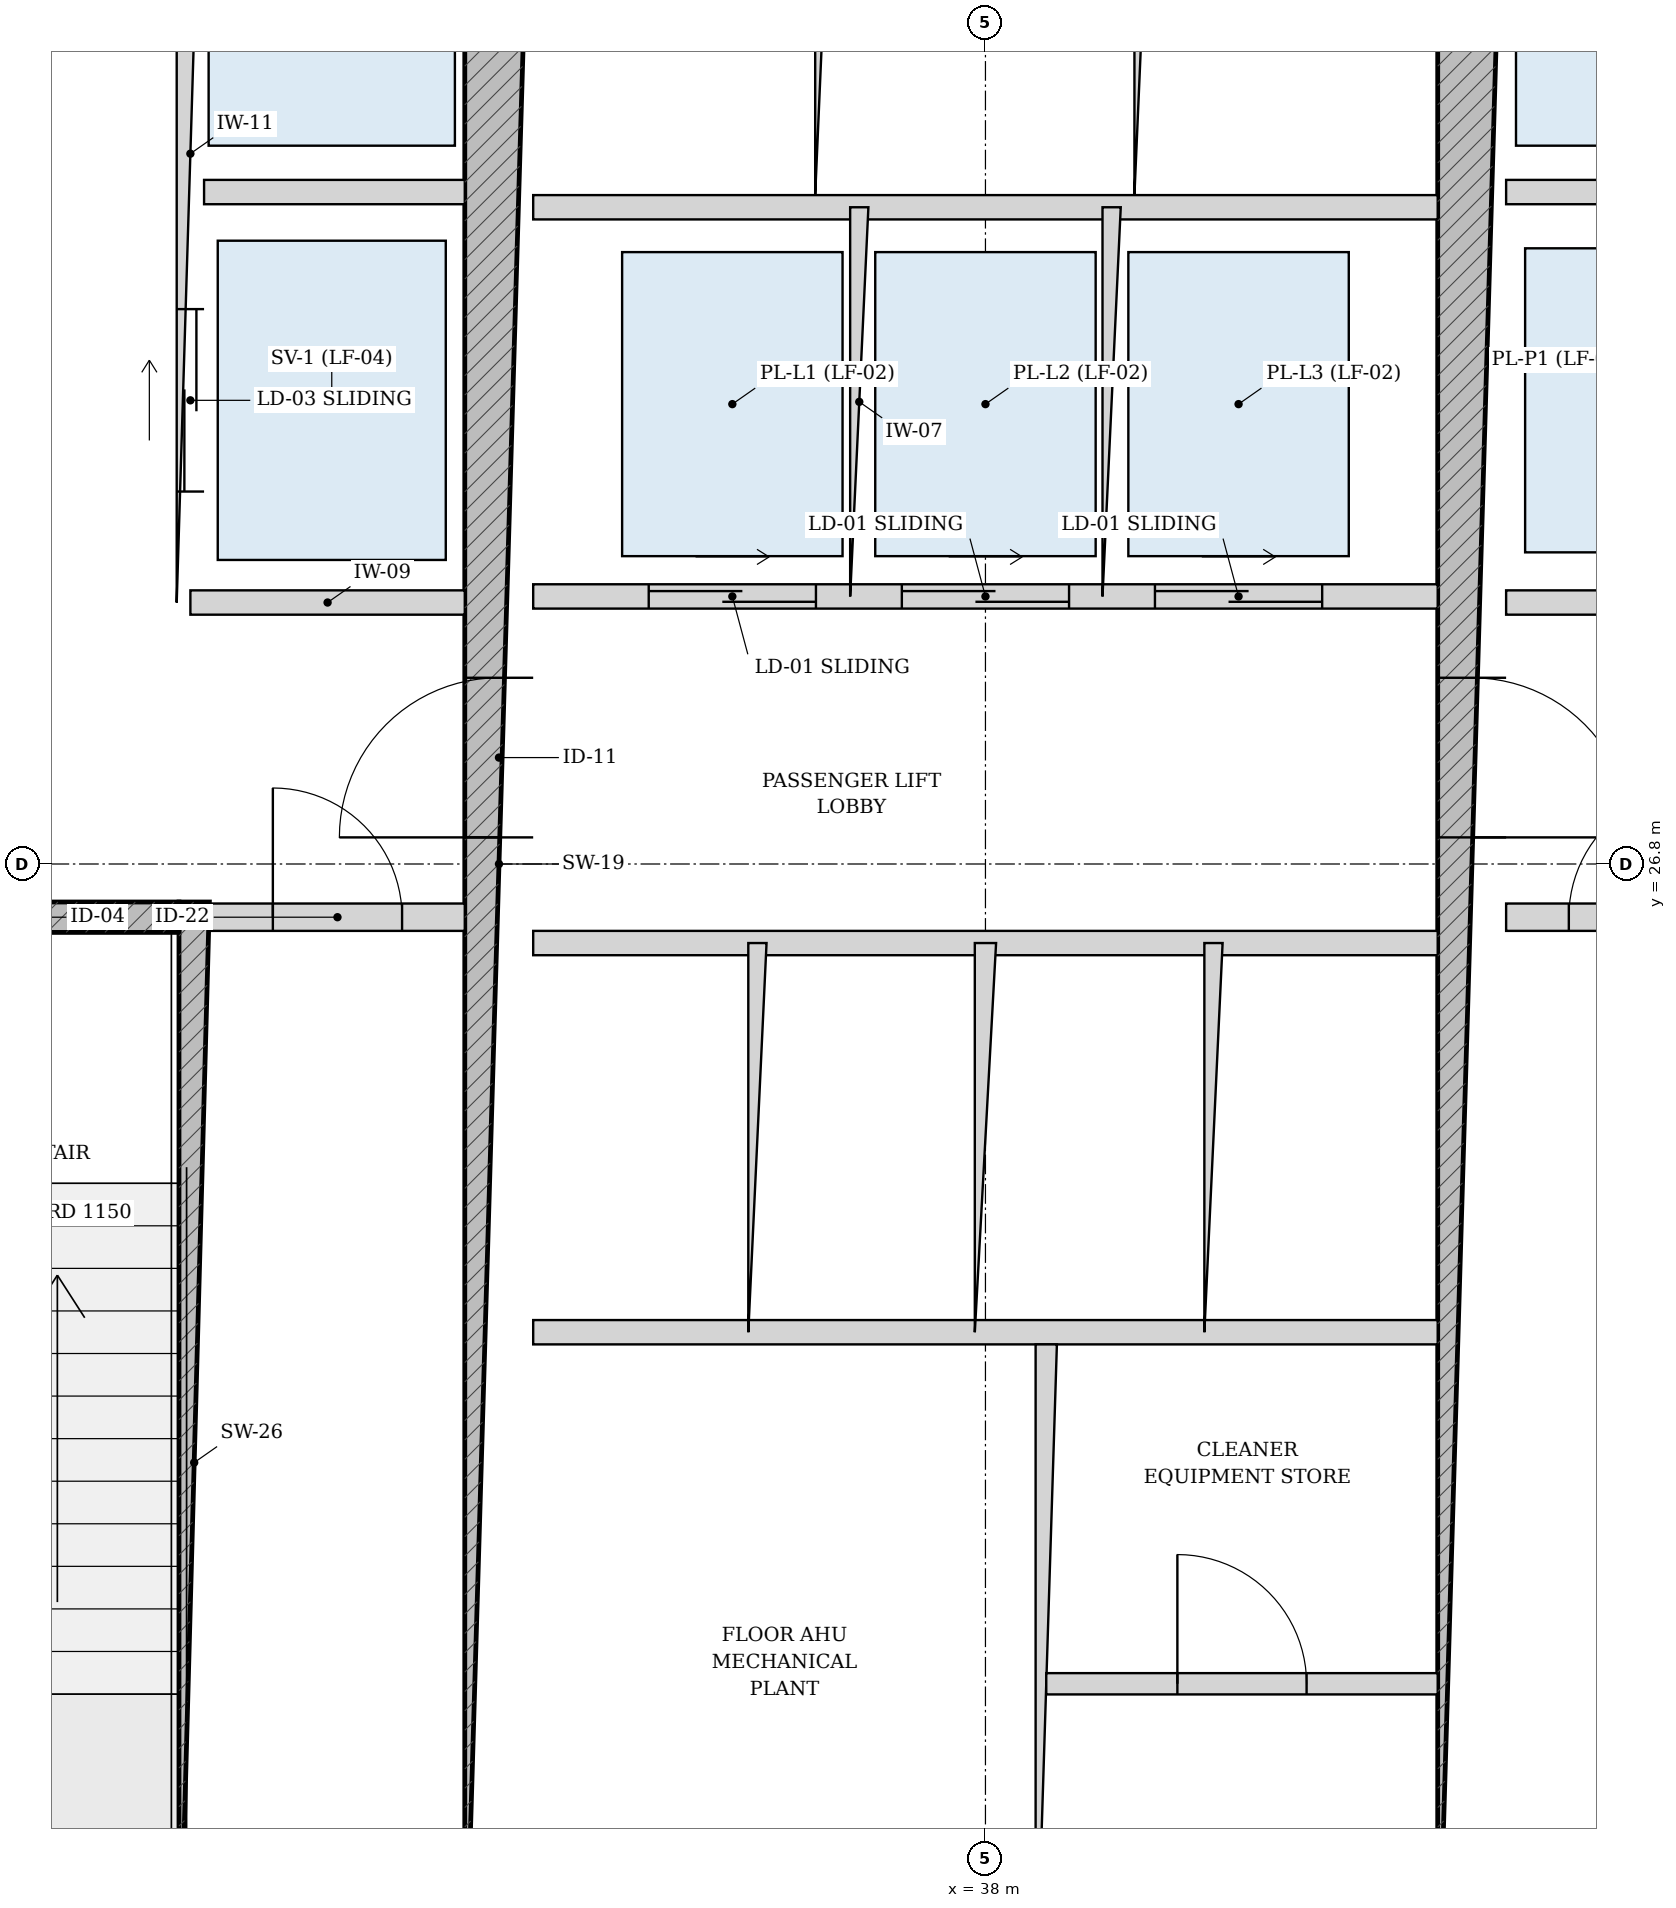
"""IFC4 building model, lengths in metres.
Left out: names, types, materials, properties, quantities, classifications, styles, units other than length and angle.
Written with IfcOpenShell. Run it as: python <this file> out.ifc"""

import sys

from ifc_helpers import new_model, si_unit, direction, frame, frame_2d, origin, place, context, subcontext, project, spatial, rectangle, extrude, source, transform, mapped, element, fill, save


model = new_model("IFC4")
c1 = context("Model", 3, precision=1e-05, world=origin(), true_north=direction((-0.2419218956, 0.970295726276)))
c2 = subcontext(c1, "Body", "Model", "MODEL_VIEW")
j1 = project(units=[si_unit("LENGTHUNIT", "METRE"), si_unit("PLANEANGLEUNIT", "RADIAN")], contexts=[c1])
p1 = place(None, origin())
s1 = spatial("IfcSite", under=j1, at=p1, CompositionType="ELEMENT")
p2 = place(p1, origin())
s2 = spatial("IfcBuilding", under=s1, at=p2, CompositionType="ELEMENT")
p3 = place(p2, frame((0.0, 0.0, 14.4)))
s3 = spatial("IfcBuildingStorey", under=s2, at=p3, CompositionType="ELEMENT", Elevation=14.4)
p4 = place(p3, frame((32.795, 19.175, 0.0), z_axis=(0.0, 0.0, 1.0), x_axis=(0.0, 1.0, 0.0)))
e1 = element("IfcWall", 1, at=p4, inside=s3, PredefinedType="SOLIDWALL", context=c2, shape_type="SweptSolid", body=[
    extrude(rectangle(XDim=7.375, YDim=0.2, at=frame_2d((3.688, 0.0))), origin(), (0.0, 0.0, 1.0), 4.05),
])
p5 = place(p3, frame((29.375, 26.45, 0.0), z_axis=(0.0, 0.0, 1.0), x_axis=(1.0, 0.0, 0.0)))
e2 = element("IfcWall", 2, at=p5, inside=s3, PredefinedType="SOLIDWALL", context=c2, shape_type="SweptSolid", body=[
    extrude(rectangle(XDim=3.32, YDim=0.2, at=frame_2d((1.66, 0.0))), origin(), (0.0, 0.0, 1.0), 4.05),
])
p6 = place(p5, frame((1.185, 0.0, 0.0)))
e3 = element("IfcOpeningElement", 3, at=p6, cuts=e2, PredefinedType="OPENING", context=c2, shape_type="SweptSolid", body=[
    extrude(rectangle(XDim=0.95, YDim=2.15, at=frame_2d((0.475, 1.075))), frame((0.0, 0.11, 0.0), z_axis=(0.0, -1.0, 0.0), x_axis=(1.0, 0.0, 0.0)), (0.0, 0.0, 1.0), 0.22),
])
p7 = place(p3, frame((34.8, 19.175, 0.0), z_axis=(0.0, 0.0, 1.0), x_axis=(0.0, 1.0, 0.0)))
e4 = element("IfcWall", 4, at=p7, inside=s3, PredefinedType="SHEAR", context=c2, shape_type="SweptSolid", body=[
    extrude(rectangle(XDim=15.25, YDim=0.45, at=frame_2d((7.625, 0.0))), origin(), (0.0, 0.0, 1.0), 4.05),
])
p8 = place(p7, frame((7.8, 0.0, 0.0)))
e5 = element("IfcOpeningElement", 5, at=p8, cuts=e4, PredefinedType="OPENING", context=c2, shape_type="SweptSolid", body=[
    extrude(rectangle(XDim=1.05, YDim=2.15, at=frame_2d((0.525, 1.075))), frame((0.0, 0.235, 0.0), z_axis=(0.0, -1.0, 0.0), x_axis=(1.0, 0.0, 0.0)), (0.0, 0.0, 1.0), 0.47),
])
p9 = place(p3, frame((41.2, 19.175, 0.0), z_axis=(0.0, 0.0, 1.0), x_axis=(0.0, 1.0, 0.0)))
e6 = element("IfcWall", 6, at=p9, inside=s3, PredefinedType="SHEAR", context=c2, shape_type="SweptSolid", body=[
    extrude(rectangle(XDim=15.25, YDim=0.45, at=frame_2d((7.625, 0.0))), origin(), (0.0, 0.0, 1.0), 4.05),
])
p10 = place(p9, frame((7.8, 0.0, 0.0)))
e7 = element("IfcOpeningElement", 7, at=p10, cuts=e6, PredefinedType="OPENING", context=c2, shape_type="SweptSolid", body=[
    extrude(rectangle(XDim=1.05, YDim=2.15, at=frame_2d((0.525, 1.075))), frame((0.0, 0.235, 0.0), z_axis=(0.0, -1.0, 0.0), x_axis=(1.0, 0.0, 0.0)), (0.0, 0.0, 1.0), 0.47),
])
p11 = place(p3, frame((32.9, 26.45, 0.0), z_axis=(0.0, 0.0, 1.0), x_axis=(1.0, 0.0, 0.0)))
e8 = element("IfcWall", 8, at=p11, inside=s3, PredefinedType="PARTITIONING", context=c2, shape_type="SweptSolid", body=[
    extrude(rectangle(XDim=1.675, YDim=0.18, at=frame_2d((0.837, 0.0))), origin(), (0.0, 0.0, 1.0), 4.05),
])
p12 = place(p11, frame((0.413, 0.0, 0.0)))
e9 = element("IfcOpeningElement", 9, at=p12, cuts=e8, PredefinedType="OPENING", context=c2, shape_type="SweptSolid", body=[
    extrude(rectangle(XDim=0.85, YDim=2.1, at=frame_2d((0.425, 1.05))), frame((0.0, 0.1, 0.0), z_axis=(0.0, -1.0, 0.0), x_axis=(1.0, 0.0, 0.0)), (0.0, 0.0, 1.0), 0.2),
])
p13 = place(p3, frame((41.425, 26.45, 0.0), z_axis=(0.0, 0.0, 1.0), x_axis=(1.0, 0.0, 0.0)))
e10 = element("IfcWall", 10, at=p13, inside=s3, PredefinedType="PARTITIONING", context=c2, shape_type="SweptSolid", body=[
    extrude(rectangle(XDim=1.675, YDim=0.18, at=frame_2d((0.837, 0.0))), origin(), (0.0, 0.0, 1.0), 4.05),
])
p14 = place(p13, frame((0.413, 0.0, 0.0)))
e11 = element("IfcOpeningElement", 11, at=p14, cuts=e10, PredefinedType="OPENING", context=c2, shape_type="SweptSolid", body=[
    extrude(rectangle(XDim=0.85, YDim=2.1, at=frame_2d((0.425, 1.05))), frame((0.0, 0.1, 0.0), z_axis=(0.0, -1.0, 0.0), x_axis=(1.0, 0.0, 0.0)), (0.0, 0.0, 1.0), 0.2),
])
p15 = place(p3, frame((32.77, 28.52, 0.0), z_axis=(0.0, 0.0, 1.0), x_axis=(0.0, 1.0, 0.0)))
e12 = element("IfcWall", 12, at=p15, inside=s3, PredefinedType="PARTITIONING", context=c2, shape_type="SweptSolid", body=[
    extrude(rectangle(XDim=5.905, YDim=0.18, at=frame_2d((2.953, 0.0))), origin(), (0.0, 0.0, 1.0), 4.05),
])
p16 = place(p15, frame((3.655, 0.0, 0.0)))
e13 = element("IfcOpeningElement", 13, at=p16, cuts=e12, PredefinedType="OPENING", context=c2, shape_type="SweptSolid", body=[
    extrude(rectangle(XDim=1.15, YDim=2.2, at=frame_2d((0.575, 1.1))), frame((0.0, 0.1, 0.0), z_axis=(0.0, -1.0, 0.0), x_axis=(1.0, 0.0, 0.0)), (0.0, 0.0, 1.0), 0.2),
])
p17 = place(p15, frame((0.73, 0.0, 0.0)))
e14 = element("IfcOpeningElement", 14, at=p17, cuts=e12, PredefinedType="OPENING", context=c2, shape_type="SweptSolid", body=[
    extrude(rectangle(XDim=1.2, YDim=2.25, at=frame_2d((0.6, 1.125))), frame((0.0, 0.1, 0.0), z_axis=(0.0, -1.0, 0.0), x_axis=(1.0, 0.0, 0.0)), (0.0, 0.0, 1.0), 0.2),
])
p18 = place(p3, frame((32.86, 31.22, 0.0), z_axis=(0.0, 0.0, 1.0), x_axis=(1.0, 0.0, 0.0)))
e15 = element("IfcWall", 15, at=p18, inside=s3, PredefinedType="PARTITIONING", context=c2, shape_type="SweptSolid", body=[
    extrude(rectangle(XDim=1.715, YDim=0.16, at=frame_2d((0.857, 0.0))), origin(), (0.0, 0.0, 1.0), 4.05),
])
p19 = place(p3, frame((32.77, 28.52, 0.0), z_axis=(0.0, 0.0, 1.0), x_axis=(1.0, 0.0, 0.0)))
e16 = element("IfcWall", 16, at=p19, inside=s3, PredefinedType="PARTITIONING", context=c2, shape_type="SweptSolid", body=[
    extrude(rectangle(XDim=1.805, YDim=0.16, at=frame_2d((0.902, 0.0))), origin(), (0.0, 0.0, 1.0), 4.05),
])
p20 = place(p3, frame((41.425, 31.22, 0.0), z_axis=(0.0, 0.0, 1.0), x_axis=(1.0, 0.0, 0.0)))
e17 = element("IfcWall", 17, at=p20, inside=s3, PredefinedType="PARTITIONING", context=c2, shape_type="SweptSolid", body=[
    extrude(rectangle(XDim=1.715, YDim=0.16, at=frame_2d((0.857, 0.0))), origin(), (0.0, 0.0, 1.0), 4.05),
])
p21 = place(p3, frame((41.425, 28.52, 0.0), z_axis=(0.0, 0.0, 1.0), x_axis=(1.0, 0.0, 0.0)))
e18 = element("IfcWall", 18, at=p21, inside=s3, PredefinedType="PARTITIONING", context=c2, shape_type="SweptSolid", body=[
    extrude(rectangle(XDim=1.805, YDim=0.16, at=frame_2d((0.902, 0.0))), origin(), (0.0, 0.0, 1.0), 4.05),
])
p22 = place(p3, frame((35.025, 28.56, 0.0), z_axis=(0.0, 0.0, 1.0), x_axis=(1.0, 0.0, 0.0)))
e19 = element("IfcWall", 19, at=p22, inside=s3, PredefinedType="PARTITIONING", context=c2, shape_type="SweptSolid", body=[
    extrude(rectangle(XDim=5.95, YDim=0.16, at=frame_2d((2.975, 0.0))), origin(), (0.0, 0.0, 1.0), 4.05),
])
p23 = place(p22, frame((0.76, 0.0, 0.0)))
e20 = element("IfcOpeningElement", 20, at=p23, cuts=e19, PredefinedType="OPENING", context=c2, shape_type="SweptSolid", body=[
    extrude(rectangle(XDim=1.1, YDim=2.2, at=frame_2d((0.55, 1.1))), frame((0.0, 0.09, 0.0), z_axis=(0.0, -1.0, 0.0), x_axis=(1.0, 0.0, 0.0)), (0.0, 0.0, 1.0), 0.18),
])
p24 = place(p22, frame((2.425, 0.0, 0.0)))
e21 = element("IfcOpeningElement", 21, at=p24, cuts=e19, PredefinedType="OPENING", context=c2, shape_type="SweptSolid", body=[
    extrude(rectangle(XDim=1.1, YDim=2.2, at=frame_2d((0.55, 1.1))), frame((0.0, 0.09, 0.0), z_axis=(0.0, -1.0, 0.0), x_axis=(1.0, 0.0, 0.0)), (0.0, 0.0, 1.0), 0.18),
])
p25 = place(p22, frame((4.09, 0.0, 0.0)))
e22 = element("IfcOpeningElement", 22, at=p25, cuts=e19, PredefinedType="OPENING", context=c2, shape_type="SweptSolid", body=[
    extrude(rectangle(XDim=1.1, YDim=2.2, at=frame_2d((0.55, 1.1))), frame((0.0, 0.09, 0.0), z_axis=(0.0, -1.0, 0.0), x_axis=(1.0, 0.0, 0.0)), (0.0, 0.0, 1.0), 0.18),
])
p26 = place(p3, frame((35.025, 31.12, 0.0), z_axis=(0.0, 0.0, 1.0), x_axis=(1.0, 0.0, 0.0)))
e23 = element("IfcWall", 23, at=p26, inside=s3, PredefinedType="PARTITIONING", context=c2, shape_type="SweptSolid", body=[
    extrude(rectangle(XDim=5.95, YDim=0.16, at=frame_2d((2.975, 0.0))), origin(), (0.0, 0.0, 1.0), 4.05),
])
for number, where, z_axis, x_axis in (
    (24, (37.17, 28.56, 0.0), (0.0, 0.0, 1.0), (0.0, 1.0, 0.0)),
    (25, (38.83, 28.56, 0.0), (0.0, 0.0, 1.0), (0.0, 1.0, 0.0)),
):
    element("IfcWall", number, at=place(p3, frame(where, z_axis=z_axis, x_axis=x_axis)), inside=s3, PredefinedType="PARTITIONING", context=c2, shape_type="SweptSolid", body=[
        extrude(rectangle(XDim=2.56, YDim=0.12, at=frame_2d((1.28, 0.0))), origin(), (0.0, 0.0, 1.0), 4.05),
    ])
for number, where, z_axis, x_axis in (
    (26, (36.95, 31.2, 0.0), (0.0, 0.0, 1.0), (0.0, 1.0, 0.0)),
    (27, (39.05, 31.2, 0.0), (0.0, 0.0, 1.0), (0.0, 1.0, 0.0)),
):
    element("IfcWall", number, at=place(p3, frame(where, z_axis=z_axis, x_axis=x_axis)), inside=s3, PredefinedType="PARTITIONING", context=c2, shape_type="SweptSolid", body=[
        extrude(rectangle(XDim=3.225, YDim=0.14, at=frame_2d((1.613, 0.0))), origin(), (0.0, 0.0, 1.0), 4.05),
    ])
for number, where, z_axis, x_axis in (
    (28, (35.025, 26.28, 0.0), (0.0, 0.0, 1.0), (1.0, 0.0, 0.0)),
    (29, (35.025, 23.72, 0.0), (0.0, 0.0, 1.0), (1.0, 0.0, 0.0)),
):
    element("IfcWall", number, at=place(p3, frame(where, z_axis=z_axis, x_axis=x_axis)), inside=s3, PredefinedType="PARTITIONING", context=c2, shape_type="SweptSolid", body=[
        extrude(rectangle(XDim=5.95, YDim=0.16, at=frame_2d((2.975, 0.0))), origin(), (0.0, 0.0, 1.0), 4.05),
    ])
p27 = place(p3, frame((36.5, 23.72, 0.0), z_axis=(0.0, 0.0, 1.0), x_axis=(0.0, 1.0, 0.0)))
e30 = element("IfcWall", 30, at=p27, inside=s3, PredefinedType="PARTITIONING", context=c2, shape_type="SweptSolid", body=[
    extrude(rectangle(XDim=2.56, YDim=0.12, at=frame_2d((1.28, 0.0))), origin(), (0.0, 0.0, 1.0), 4.05),
])
p28 = place(p3, frame((38.0, 23.72, 0.0), z_axis=(0.0, 0.0, 1.0), x_axis=(0.0, 1.0, 0.0)))
e31 = element("IfcWall", 31, at=p28, inside=s3, PredefinedType="PARTITIONING", context=c2, shape_type="SweptSolid", body=[
    extrude(rectangle(XDim=2.56, YDim=0.14, at=frame_2d((1.28, 0.0))), origin(), (0.0, 0.0, 1.0), 4.05),
])
p29 = place(p3, frame((39.5, 23.72, 0.0), z_axis=(0.0, 0.0, 1.0), x_axis=(0.0, 1.0, 0.0)))
e32 = element("IfcWall", 32, at=p29, inside=s3, PredefinedType="PARTITIONING", context=c2, shape_type="SweptSolid", body=[
    extrude(rectangle(XDim=2.56, YDim=0.12, at=frame_2d((1.28, 0.0))), origin(), (0.0, 0.0, 1.0), 4.05),
])
p30 = place(p3, frame((38.4, 19.175, 0.0), z_axis=(0.0, 0.0, 1.0), x_axis=(0.0, 1.0, 0.0)))
e33 = element("IfcWall", 33, at=p30, inside=s3, PredefinedType="PARTITIONING", context=c2, shape_type="SweptSolid", body=[
    extrude(rectangle(XDim=4.465, YDim=0.14, at=frame_2d((2.232, 0.0))), origin(), (0.0, 0.0, 1.0), 4.05),
])
p31 = place(p3, frame((38.4, 21.407, 0.0), z_axis=(0.0, 0.0, 1.0), x_axis=(1.0, 0.0, 0.0)))
e34 = element("IfcWall", 34, at=p31, inside=s3, PredefinedType="PARTITIONING", context=c2, shape_type="SweptSolid", body=[
    extrude(rectangle(XDim=2.575, YDim=0.14, at=frame_2d((1.288, 0.0))), origin(), (0.0, 0.0, 1.0), 4.05),
])
p32 = place(p31, frame((0.863, 0.0, 0.0)))
e35 = element("IfcOpeningElement", 35, at=p32, cuts=e34, PredefinedType="OPENING", context=c2, shape_type="SweptSolid", body=[
    extrude(rectangle(XDim=0.85, YDim=2.1, at=frame_2d((0.425, 1.05))), frame((0.0, 0.08, 0.0), z_axis=(0.0, -1.0, 0.0), x_axis=(1.0, 0.0, 0.0)), (0.0, 0.0, 1.0), 0.16),
])
m1 = source(origin(), c2, "Body", "SweptSolid", [
    extrude(rectangle(XDim=1.05, YDim=2.15, at=frame_2d((0.525, 1.075))), frame((0.0, 0.025, 0.0), z_axis=(0.0, -1.0, 0.0), x_axis=(1.0, 0.0, 0.0)), (0.0, 0.0, 1.0), 0.05),
])
p33 = place(p8, origin())
e36 = element("IfcDoor", 36, at=p33, inside=s3, OperationType="SINGLE_SWING_LEFT", PredefinedType="DOOR", context=c2, shape_type="MappedRepresentation", body=[
    mapped(m1, transform((0.0, 0.0, 0.0), scale=1.0)),
])
fill(e5, e36)
p34 = place(p10, frame((1.05, 0.0, 0.0), z_axis=(0.0, 0.0, 1.0), x_axis=(-1.0, 0.0, 0.0)))
e37 = element("IfcDoor", 37, at=p34, inside=s3, OperationType="SINGLE_SWING_RIGHT", PredefinedType="DOOR", context=c2, shape_type="MappedRepresentation", body=[
    mapped(m1, transform((0.0, 0.0, 0.0), scale=1.0)),
])
fill(e7, e37)
m2 = source(origin(), c2, "Body", "SweptSolid", [
    extrude(rectangle(XDim=0.85, YDim=2.1, at=frame_2d((0.425, 1.05))), frame((0.0, 0.025, 0.0), z_axis=(0.0, -1.0, 0.0), x_axis=(1.0, 0.0, 0.0)), (0.0, 0.0, 1.0), 0.05),
])
p35 = place(p12, origin())
e38 = element("IfcDoor", 38, at=p35, inside=s3, OperationType="SINGLE_SWING_LEFT", PredefinedType="DOOR", context=c2, shape_type="MappedRepresentation", body=[
    mapped(m2, transform((0.0, 0.0, 0.0), scale=1.0)),
])
fill(e9, e38)
p36 = place(p14, origin())
e39 = element("IfcDoor", 39, at=p36, inside=s3, OperationType="SINGLE_SWING_RIGHT", PredefinedType="DOOR", context=c2, shape_type="MappedRepresentation", body=[
    mapped(m2, transform((0.0, 0.0, 0.0), scale=1.0)),
])
fill(e11, e39)
p37 = place(p32, origin())
e40 = element("IfcDoor", 40, at=p37, inside=s3, OperationType="SINGLE_SWING_LEFT", PredefinedType="DOOR", context=c2, shape_type="MappedRepresentation", body=[
    mapped(m2, transform((0.0, 0.0, 0.0), scale=1.0)),
])
fill(e35, e40)
m3 = source(origin(), c2, "Body", "SweptSolid", [
    extrude(rectangle(XDim=1.2, YDim=2.25, at=frame_2d((0.6, 1.125))), frame((0.0, 0.025, 0.0), z_axis=(0.0, -1.0, 0.0), x_axis=(1.0, 0.0, 0.0)), (0.0, 0.0, 1.0), 0.05),
])
p38 = place(p17, origin())
e41 = element("IfcDoor", 41, at=p38, inside=s3, OperationType="DOUBLE_DOOR_SLIDING", PredefinedType="DOOR", context=c2, shape_type="MappedRepresentation", body=[
    mapped(m3, transform((0.0, 0.0, 0.0), scale=1.0)),
])
fill(e14, e41)
m4 = source(origin(), c2, "Body", "SweptSolid", [
    extrude(rectangle(XDim=1.1, YDim=2.2, at=frame_2d((0.55, 1.1))), frame((0.0, 0.025, 0.0), z_axis=(0.0, -1.0, 0.0), x_axis=(1.0, 0.0, 0.0)), (0.0, 0.0, 1.0), 0.05),
])
p39 = place(p23, origin())
e42 = element("IfcDoor", 42, at=p39, inside=s3, OperationType="DOUBLE_DOOR_SLIDING", PredefinedType="DOOR", context=c2, shape_type="MappedRepresentation", body=[
    mapped(m4, transform((0.0, 0.0, 0.0), scale=1.0)),
])
fill(e20, e42)
p40 = place(p24, origin())
e43 = element("IfcDoor", 43, at=p40, inside=s3, OperationType="DOUBLE_DOOR_SLIDING", PredefinedType="DOOR", context=c2, shape_type="MappedRepresentation", body=[
    mapped(m4, transform((0.0, 0.0, 0.0), scale=1.0)),
])
fill(e21, e43)
p41 = place(p25, origin())
e44 = element("IfcDoor", 44, at=p41, inside=s3, OperationType="DOUBLE_DOOR_SLIDING", PredefinedType="DOOR", context=c2, shape_type="MappedRepresentation", body=[
    mapped(m4, transform((0.0, 0.0, 0.0), scale=1.0)),
])
fill(e22, e44)
save(model, sys.argv[1])
